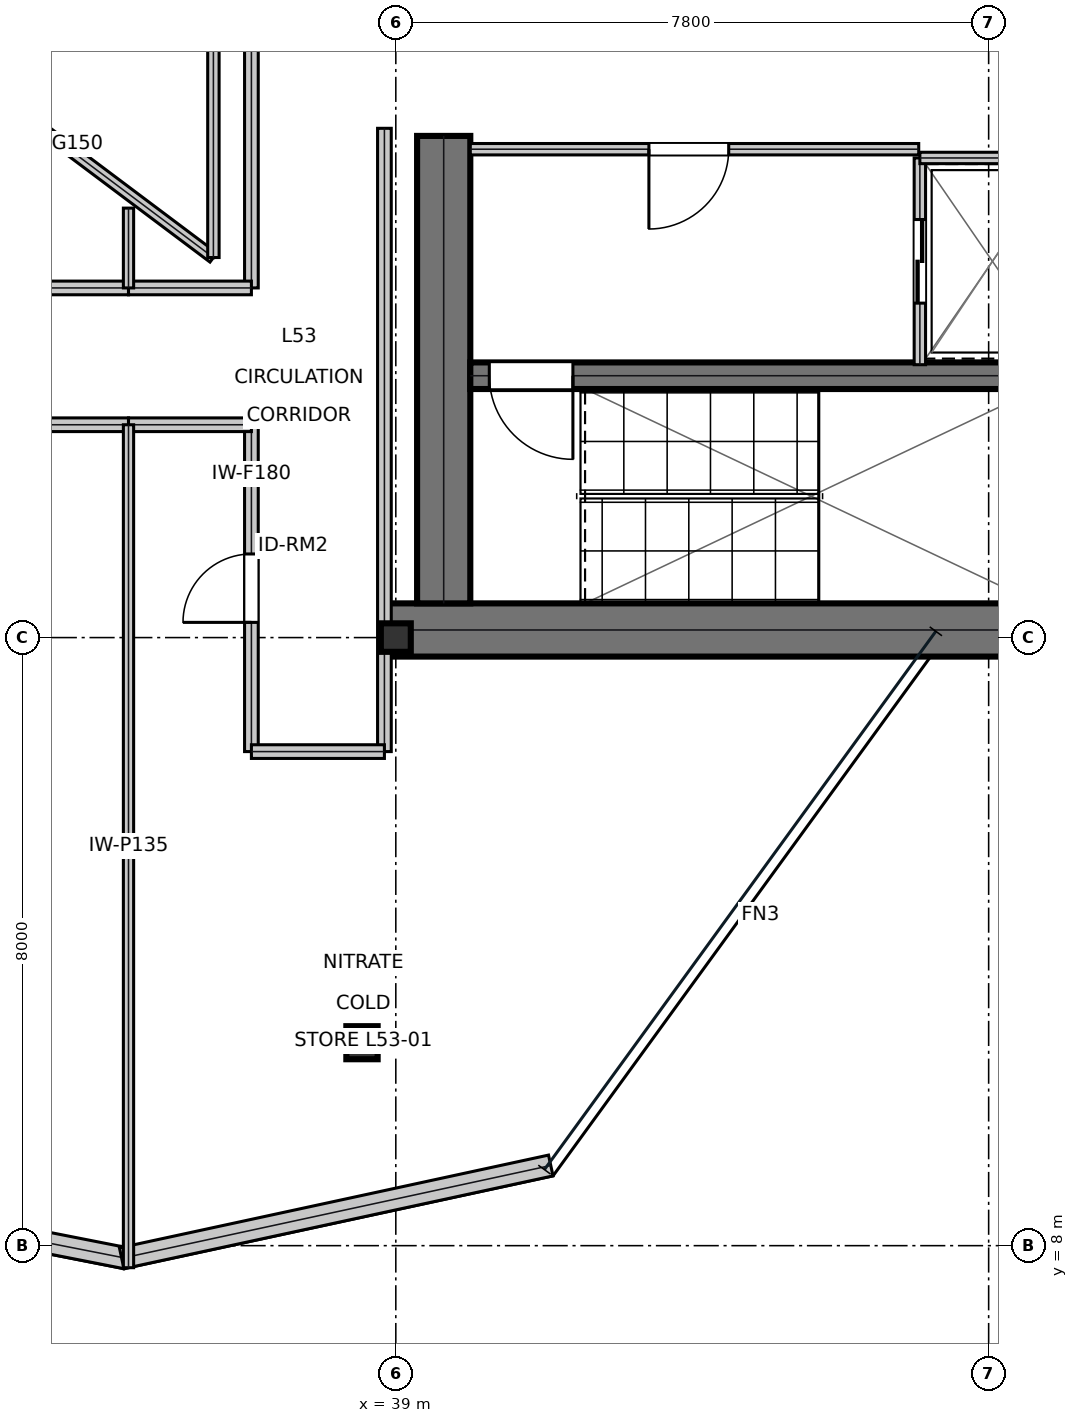
"""IFC4 building model, lengths in metres.
Left out: names, types, materials, properties, quantities, classifications, styles, units other than length and angle.
Written with IfcOpenShell. Run it as: python <this file> out.ifc"""

import sys

from ifc_helpers import new_model, si_unit, direction, frame, frame_2d, origin, origin_2d, place, context, subcontext, project, spatial, rectangle, i_section, extrude, element, fill, save


model = new_model("IFC4")
c1 = context("Model", 3, precision=1e-05, world=origin(), true_north=direction((0.0, 1.0)))
c2 = subcontext(c1, "Body", "Model", "MODEL_VIEW")
j1 = project(units=[si_unit("LENGTHUNIT", "METRE"), si_unit("PLANEANGLEUNIT", "RADIAN")], contexts=[c1])
p1 = place(None, origin())
s1 = spatial("IfcSite", under=j1, at=p1, CompositionType="ELEMENT")
p2 = place(p1, origin())
s2 = spatial("IfcBuilding", under=s1, at=p2, CompositionType="ELEMENT")
p3 = place(p2, frame((0.0, 0.0, 228.3)))
s3 = spatial("IfcBuildingStorey", under=s2, at=p3, CompositionType="ELEMENT", Elevation=228.3)
p4 = place(p3, frame((38.8, 16.1, 0.0), z_axis=(0.0, 0.0, 1.0), x_axis=(1.0, 0.0, 0.0)))
e1 = element("IfcWall", 1, at=p4, inside=s3, PredefinedType="SHEAR", context=c2, shape_type="SweptSolid", body=[
    extrude(rectangle(XDim=16.0, YDim=0.7, at=frame_2d((8.0, 0.0))), origin(), (0.0, 0.0, 1.0), 3.79),
])
p5 = place(p3, frame((39.63, 16.45, 0.0), z_axis=(0.0, 0.0, 1.0), x_axis=(0.0, 1.0, 0.0)))
e2 = element("IfcWall", 2, at=p5, inside=s3, PredefinedType="SHEAR", context=c2, shape_type="SweptSolid", body=[
    extrude(rectangle(XDim=6.15, YDim=0.7, at=frame_2d((3.075, 0.0))), origin(), (0.0, 0.0, 1.0), 3.79),
])
p6 = place(p3, frame((39.98, 19.445, 0.0), z_axis=(0.0, 0.0, 1.0), x_axis=(1.0, 0.0, 0.0)))
e3 = element("IfcWall", 3, at=p6, inside=s3, PredefinedType="SHEAR", context=c2, shape_type="SweptSolid", body=[
    extrude(rectangle(XDim=7.71, YDim=0.35, at=frame_2d((3.855, 0.0))), origin(), (0.0, 0.0, 1.0), 3.79),
])
p7 = place(p6, frame((0.25, 0.0, 0.0)))
e4 = element("IfcOpeningElement", 4, at=p7, cuts=e3, PredefinedType="OPENING", context=c2, shape_type="SweptSolid", body=[
    extrude(rectangle(XDim=1.1, YDim=2.15, at=frame_2d((0.55, 1.075))), frame((0.0, 0.185, 0.0), z_axis=(0.0, -1.0, 0.0), x_axis=(1.0, 0.0, 0.0)), (0.0, 0.0, 1.0), 0.37),
])
p8 = place(p3, frame((39.0, 16.0, 0.0), z_axis=(0.0, 0.0, 1.0), x_axis=(1.0, 0.0, 0.0)))
e5 = element("IfcColumn", 5, at=p8, inside=s3, PredefinedType="COLUMN", context=c2, shape_type="SweptSolid", body=[
    extrude(i_section(OverallWidth=0.394, OverallDepth=0.375, WebThickness=0.017, FlangeThickness=0.028, at=origin_2d()), origin(), (0.0, 0.0, 1.0), 4.044),
])
p9 = place(p3, frame((38.555, 10.67, 0.016), z_axis=(0.0, 0.0, 1.0), x_axis=(1.0, 0.0, 0.0)))
e6 = element("IfcColumn", 6, at=p9, inside=s3, PredefinedType="COLUMN", context=c2, shape_type="SweptSolid", body=[
    extrude(i_section(OverallWidth=0.412, OverallDepth=0.435, WebThickness=0.036, FlangeThickness=0.058, at=origin_2d()), origin(), (0.0, 0.0, 1.0), 4.018),
])
p10 = place(p3, frame((29.804, 8.944, 0.0), z_axis=(0.0, 0.0, 1.0), x_axis=(0.981218426529, -0.192899972626, 0.0)))
e7 = element("IfcWall", 7, at=p10, inside=s3, PredefinedType="STANDARD", context=c2, shape_type="SweptSolid", body=[
    extrude(rectangle(XDim=5.754, YDim=0.28, at=frame_2d((2.877, 0.0))), origin(), (0.0, 0.0, 1.0), 3.79),
])
p11 = place(p3, frame((35.393, 7.834, 0.0), z_axis=(0.0, 0.0, 1.0), x_axis=(0.977403545606, 0.211381903286, 0.0)))
e8 = element("IfcWall", 8, at=p11, inside=s3, PredefinedType="STANDARD", context=c2, shape_type="SweptSolid", body=[
    extrude(rectangle(XDim=5.776, YDim=0.28, at=frame_2d((2.888, 0.0))), origin(), (0.0, 0.0, 1.0), 3.79),
])
p12 = place(p3, frame((39.98, 22.425, 0.0), z_axis=(0.0, 0.0, 1.0), x_axis=(1.0, 0.0, 0.0)))
e9 = element("IfcWall", 9, at=p12, inside=s3, PredefinedType="PARTITIONING", context=c2, shape_type="SweptSolid", body=[
    extrude(rectangle(XDim=5.9, YDim=0.15, at=frame_2d((2.95, 0.0))), origin(), (0.0, 0.0, 1.0), 3.79),
])
p13 = place(p12, frame((2.35, 0.0, 0.0)))
e10 = element("IfcOpeningElement", 10, at=p13, cuts=e9, PredefinedType="OPENING", context=c2, shape_type="SweptSolid", body=[
    extrude(rectangle(XDim=1.05, YDim=2.15, at=frame_2d((0.525, 1.075))), frame((0.0, 0.085, 0.0), z_axis=(0.0, -1.0, 0.0), x_axis=(1.0, 0.0, 0.0)), (0.0, 0.0, 1.0), 0.17),
])
p14 = place(p3, frame((45.895, 19.59, 0.0), z_axis=(0.0, 0.0, 1.0), x_axis=(0.0, 1.0, 0.0)))
e11 = element("IfcWall", 11, at=p14, inside=s3, PredefinedType="PARTITIONING", context=c2, shape_type="SweptSolid", body=[
    extrude(rectangle(XDim=2.72, YDim=0.15, at=frame_2d((1.36, 0.0))), origin(), (0.0, 0.0, 1.0), 3.79),
])
p15 = place(p14, frame((0.81, 0.0, 0.0)))
e12 = element("IfcOpeningElement", 12, at=p15, cuts=e11, PredefinedType="OPENING", context=c2, shape_type="SweptSolid", body=[
    extrude(rectangle(XDim=1.1, YDim=2.15, at=frame_2d((0.55, 1.075))), frame((0.0, 0.085, 0.0), z_axis=(0.0, -1.0, 0.0), x_axis=(1.0, 0.0, 0.0)), (0.0, 0.0, 1.0), 0.17),
])
p16 = place(p3, frame((45.895, 22.31, 0.0), z_axis=(0.0, 0.0, 1.0), x_axis=(1.0, 0.0, 0.0)))
e13 = element("IfcWall", 13, at=p16, inside=s3, PredefinedType="PARTITIONING", context=c2, shape_type="SweptSolid", body=[
    extrude(rectangle(XDim=1.915, YDim=0.15, at=frame_2d((0.958, 0.0))), origin(), (0.0, 0.0, 1.0), 3.79),
])
p17 = place(p3, frame((37.1, 14.5, 0.0), z_axis=(0.0, 0.0, 1.0), x_axis=(0.0, 1.0, 0.0)))
e14 = element("IfcWall", 14, at=p17, inside=s3, PredefinedType="SOLIDWALL", context=c2, shape_type="SweptSolid", body=[
    extrude(rectangle(XDim=4.3, YDim=0.18, at=frame_2d((2.15, 0.0))), origin(), (0.0, 0.0, 1.0), 3.241),
])
p18 = place(p17, frame((1.7, 0.0, 0.0)))
e15 = element("IfcOpeningElement", 15, at=p18, cuts=e14, PredefinedType="OPENING", context=c2, shape_type="SweptSolid", body=[
    extrude(rectangle(XDim=0.9, YDim=2.15, at=frame_2d((0.45, 1.075))), frame((0.0, 0.1, 0.0), z_axis=(0.0, -1.0, 0.0), x_axis=(1.0, 0.0, 0.0)), (0.0, 0.0, 1.0), 0.2),
])
p19 = place(p3, frame((26.418, 18.8, 0.0), z_axis=(0.0, 0.0, 1.0), x_axis=(1.0, 0.0, 0.0)))
e16 = element("IfcWall", 16, at=p19, inside=s3, PredefinedType="SOLIDWALL", context=c2, shape_type="SweptSolid", body=[
    extrude(rectangle(XDim=9.064, YDim=0.18, at=frame_2d((4.532, 0.0))), origin(), (0.0, 0.0, 1.0), 3.241),
])
p20 = place(p19, frame((4.082, 0.0, 0.0)))
e17 = element("IfcOpeningElement", 17, at=p20, cuts=e16, PredefinedType="OPENING", context=c2, shape_type="SweptSolid", body=[
    extrude(rectangle(XDim=0.9, YDim=2.15, at=frame_2d((0.45, 1.075))), frame((0.0, 0.1, 0.0), z_axis=(0.0, -1.0, 0.0), x_axis=(1.0, 0.0, 0.0)), (0.0, 0.0, 1.0), 0.2),
])
p21 = place(p3, frame((26.4, 20.6, 0.0), z_axis=(0.0, 0.0, 1.0), x_axis=(1.0, 0.0, 0.0)))
e18 = element("IfcWall", 18, at=p21, inside=s3, PredefinedType="SOLIDWALL", context=c2, shape_type="SweptSolid", body=[
    extrude(rectangle(XDim=9.083, YDim=0.18, at=frame_2d((4.542, 0.0))), origin(), (0.0, 0.0, 1.0), 3.241),
])
p22 = place(p21, frame((4.092, 0.0, 0.0)))
e19 = element("IfcOpeningElement", 19, at=p22, cuts=e18, PredefinedType="OPENING", context=c2, shape_type="SweptSolid", body=[
    extrude(rectangle(XDim=0.9, YDim=2.15, at=frame_2d((0.45, 1.075))), frame((0.0, 0.1, 0.0), z_axis=(0.0, -1.0, 0.0), x_axis=(1.0, 0.0, 0.0)), (0.0, 0.0, 1.0), 0.2),
])
p23 = place(p3, frame((37.1, 20.6, 0.0), z_axis=(0.0, 0.0, 1.0), x_axis=(0.0, 1.0, 0.0)))
e20 = element("IfcWall", 20, at=p23, inside=s3, PredefinedType="SOLIDWALL", context=c2, shape_type="SweptSolid", body=[
    extrude(rectangle(XDim=12.9, YDim=0.18, at=frame_2d((6.45, 0.0))), origin(), (0.0, 0.0, 1.0), 3.241),
])
p24 = place(p23, frame((7.44, 0.0, 0.0)))
e21 = element("IfcOpeningElement", 21, at=p24, cuts=e20, PredefinedType="OPENING", context=c2, shape_type="SweptSolid", body=[
    extrude(rectangle(XDim=0.9, YDim=2.15, at=frame_2d((0.45, 1.075))), frame((0.0, 0.1, 0.0), z_axis=(0.0, -1.0, 0.0), x_axis=(1.0, 0.0, 0.0)), (0.0, 0.0, 1.0), 0.2),
])
p25 = place(p3, frame((38.85, 14.5, 0.0), z_axis=(0.0, 0.0, 1.0), x_axis=(0.0, 1.0, 0.0)))
e22 = element("IfcWall", 22, at=p25, inside=s3, PredefinedType="SOLIDWALL", context=c2, shape_type="SweptSolid", body=[
    extrude(rectangle(XDim=8.2, YDim=0.18, at=frame_2d((4.1, 0.0))), origin(), (0.0, 0.0, 1.0), 3.241),
])
p26 = place(p3, frame((37.1, 14.5, 0.0), z_axis=(0.0, 0.0, 1.0), x_axis=(1.0, 0.0, 0.0)))
e23 = element("IfcWall", 23, at=p26, inside=s3, PredefinedType="SOLIDWALL", context=c2, shape_type="SweptSolid", body=[
    extrude(rectangle(XDim=1.75, YDim=0.18, at=frame_2d((0.875, 0.0))), origin(), (0.0, 0.0, 1.0), 3.241),
])
p27 = place(p3, frame((35.483, 18.8, 0.0), z_axis=(0.0, 0.0, 1.0), x_axis=(1.0, 0.0, 0.0)))
e24 = element("IfcWall", 24, at=p27, inside=s3, PredefinedType="SOLIDWALL", context=c2, shape_type="SweptSolid", body=[
    extrude(rectangle(XDim=1.617, YDim=0.18, at=frame_2d((0.809, 0.0))), origin(), (0.0, 0.0, 1.0), 3.79),
])
p28 = place(p3, frame((35.483, 20.6, 0.0), z_axis=(0.0, 0.0, 1.0), x_axis=(1.0, 0.0, 0.0)))
e25 = element("IfcWall", 25, at=p28, inside=s3, PredefinedType="SOLIDWALL", context=c2, shape_type="SweptSolid", body=[
    extrude(rectangle(XDim=1.617, YDim=0.18, at=frame_2d((0.809, 0.0))), origin(), (0.0, 0.0, 1.0), 3.468),
])
p29 = place(p3, frame((35.483, 7.71, 0.0), z_axis=(0.0, 0.0, 1.0), x_axis=(0.0, 1.0, 0.0)))
e26 = element("IfcWall", 26, at=p29, inside=s3, PredefinedType="PARTITIONING", context=c2, shape_type="SweptSolid", body=[
    extrude(rectangle(XDim=11.09, YDim=0.135, at=frame_2d((5.545, 0.0))), origin(), (0.0, 0.0, 1.0), 3.241),
])
p30 = place(p3, frame((35.483, 20.6, 0.0), z_axis=(0.0, 0.0, 1.0), x_axis=(0.0, 1.0, 0.0)))
e27 = element("IfcWall", 27, at=p30, inside=s3, PredefinedType="PARTITIONING", context=c2, shape_type="SweptSolid", body=[
    extrude(rectangle(XDim=1.05, YDim=0.135, at=frame_2d((0.525, 0.0))), origin(), (0.0, 0.0, 1.0), 3.79),
])
p31 = place(p3, frame((32.6, 24.0, 0.0), z_axis=(0.0, 0.0, 1.0), x_axis=(0.8, -0.6, 0.0)))
e28 = element("IfcWall", 28, at=p31, inside=s3, PredefinedType="MOVABLE", context=c2, shape_type="SweptSolid", body=[
    extrude(rectangle(XDim=5.0, YDim=0.15, at=frame_2d((2.5, 0.0))), origin(), (0.0, 0.0, 1.0), 3.79),
])
p32 = place(p3, frame((36.6, 21.0, 0.0), z_axis=(0.0, 0.0, 1.0), x_axis=(0.0, 1.0, 0.0)))
e29 = element("IfcWall", 29, at=p32, inside=s3, PredefinedType="MOVABLE", context=c2, shape_type="SweptSolid", body=[
    extrude(rectangle(XDim=6.0, YDim=0.15, at=frame_2d((3.0, 0.0))), origin(), (0.0, 0.0, 1.0), 3.79),
])
p33 = place(p13, frame((1.05, 0.0, 0.0), z_axis=(0.0, 0.0, 1.0), x_axis=(-1.0, 0.0, 0.0)))
e30 = element("IfcDoor", 30, at=p33, inside=s3, OperationType="SINGLE_SWING_RIGHT", PredefinedType="DOOR", context=c2, shape_type="SweptSolid", body=[
    extrude(rectangle(XDim=1.05, YDim=2.15, at=frame_2d((0.525, 1.075))), frame((0.0, 0.025, 0.0), z_axis=(0.0, -1.0, 0.0), x_axis=(1.0, 0.0, 0.0)), (0.0, 0.0, 1.0), 0.05),
])
fill(e10, e30)
p34 = place(p15, frame((1.1, 0.0, 0.0), z_axis=(0.0, 0.0, 1.0), x_axis=(-1.0, 0.0, 0.0)))
e31 = element("IfcDoor", 31, at=p34, inside=s3, OperationType="DOUBLE_DOOR_SLIDING", PredefinedType="DOOR", context=c2, shape_type="SweptSolid", body=[
    extrude(rectangle(XDim=1.1, YDim=2.15, at=frame_2d((0.55, 1.075))), frame((0.0, 0.025, 0.0), z_axis=(0.0, -1.0, 0.0), x_axis=(1.0, 0.0, 0.0)), (0.0, 0.0, 1.0), 0.05),
])
fill(e12, e31)
p35 = place(p18, origin())
e32 = element("IfcDoor", 32, at=p35, inside=s3, OperationType="SINGLE_SWING_LEFT", PredefinedType="DOOR", context=c2, shape_type="SweptSolid", body=[
    extrude(rectangle(XDim=0.9, YDim=2.15, at=frame_2d((0.45, 1.075))), frame((0.0, 0.025, 0.0), z_axis=(0.0, -1.0, 0.0), x_axis=(1.0, 0.0, 0.0)), (0.0, 0.0, 1.0), 0.05),
])
fill(e15, e32)
p36 = place(p7, frame((1.1, 0.0, 0.0), z_axis=(0.0, 0.0, 1.0), x_axis=(-1.0, 0.0, 0.0)))
e33 = element("IfcDoor", 33, at=p36, inside=s3, OperationType="SINGLE_SWING_LEFT", PredefinedType="DOOR", context=c2, shape_type="SweptSolid", body=[
    extrude(rectangle(XDim=1.1, YDim=2.15, at=frame_2d((0.55, 1.075))), frame((0.0, 0.025, 0.0), z_axis=(0.0, -1.0, 0.0), x_axis=(1.0, 0.0, 0.0)), (0.0, 0.0, 1.0), 0.05),
])
fill(e4, e33)
save(model, sys.argv[1])
